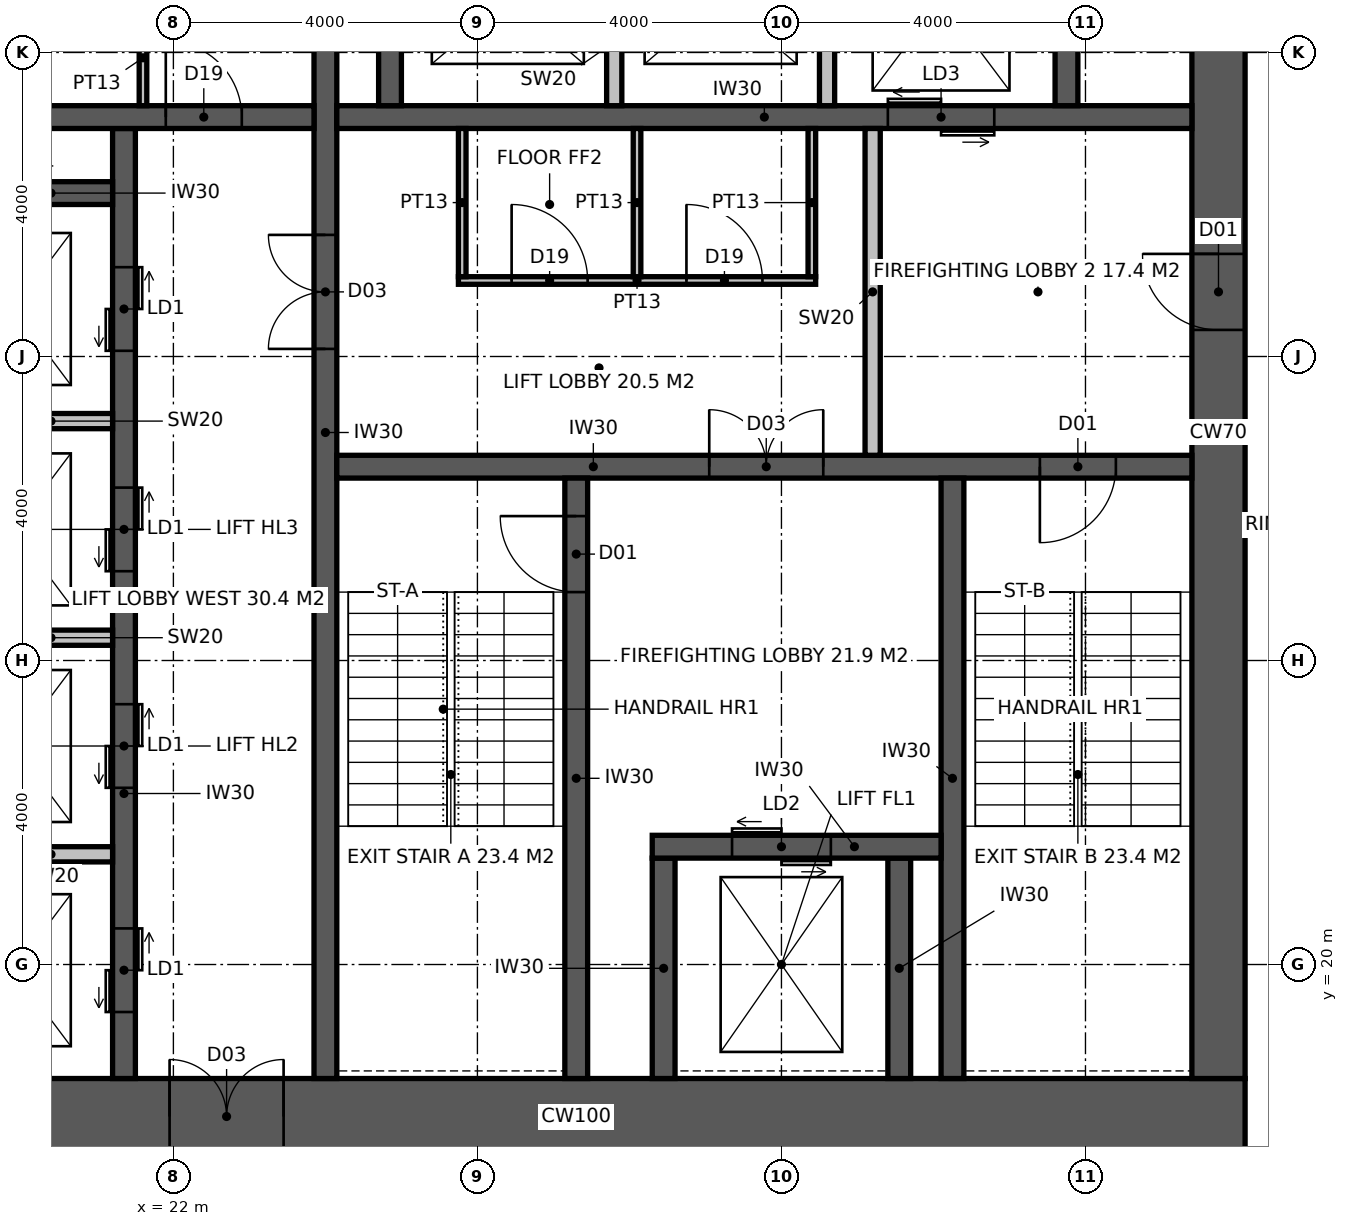
"""IFC4 building model, lengths in metres.
Left out: names, types, materials, properties, quantities, classifications, styles, units other than length and angle.
Written with IfcOpenShell. Run it as: python <this file> out.ifc"""

import sys

from ifc_helpers import new_model, si_unit, direction, frame, frame_2d, origin, place, context, subcontext, project, spatial, rectangle, extrude, element, fill, save


model = new_model("IFC4")
c1 = context("Model", 3, precision=1e-05, world=origin(), true_north=direction((0.0, 1.0)))
c2 = subcontext(c1, "Body", "Model", "MODEL_VIEW")
j1 = project(units=[si_unit("LENGTHUNIT", "METRE"), si_unit("PLANEANGLEUNIT", "RADIAN")], contexts=[c1])
p1 = place(None, origin())
s1 = spatial("IfcSite", under=j1, at=p1, CompositionType="ELEMENT")
p2 = place(p1, origin())
s2 = spatial("IfcBuilding", under=s1, at=p2, CompositionType="ELEMENT")
p3 = place(p2, frame((0.0, 0.0, 175.8)))
s3 = spatial("IfcBuildingStorey", under=s2, at=p3, CompositionType="ELEMENT", Elevation=175.8)
p4 = place(p3, frame((18.5, 18.0, -0.15), z_axis=(0.0, 0.0, 1.0), x_axis=(1.0, 0.0, 0.0)))
e1 = element("IfcWall", 1, at=p4, inside=s3, PredefinedType="SHEAR", context=c2, shape_type="SweptSolid", body=[
    extrude(rectangle(XDim=17.6, YDim=1.0, at=frame_2d((8.8, 0.0))), origin(), (0.0, 0.0, 1.0), 4.0),
])
p5 = place(p4, frame((3.45, 0.0, 0.15)))
e2 = element("IfcOpeningElement", 2, at=p5, cuts=e1, PredefinedType="OPENING", context=c2, shape_type="SweptSolid", body=[
    extrude(rectangle(XDim=1.5, YDim=2.4, at=frame_2d((0.75, 1.2))), frame((0.0, 0.51, 0.0), z_axis=(0.0, -1.0, 0.0), x_axis=(1.0, 0.0, 0.0)), (0.0, 0.0, 1.0), 1.02),
])
p6 = place(p3, frame((35.75, 18.5, -0.15), z_axis=(0.0, 0.0, 1.0), x_axis=(0.0, 1.0, 0.0)))
e3 = element("IfcWall", 3, at=p6, inside=s3, PredefinedType="SHEAR", context=c2, shape_type="SweptSolid", body=[
    extrude(rectangle(XDim=17.0, YDim=0.7, at=frame_2d((8.5, 0.0))), origin(), (0.0, 0.0, 1.0), 4.0),
])
p7 = place(p6, frame((9.85, 0.0, 0.15)))
e4 = element("IfcOpeningElement", 4, at=p7, cuts=e3, PredefinedType="OPENING", context=c2, shape_type="SweptSolid", body=[
    extrude(rectangle(XDim=1.0, YDim=2.2, at=frame_2d((0.5, 1.1))), frame((0.0, 0.36, 0.0), z_axis=(0.0, -1.0, 0.0), x_axis=(1.0, 0.0, 0.0)), (0.0, 0.0, 1.0), 0.72),
])
p8 = place(p3, frame((24.0, 18.5, -0.15), z_axis=(0.0, 0.0, 1.0), x_axis=(0.0, 1.0, 0.0)))
e5 = element("IfcWall", 5, at=p8, inside=s3, PredefinedType="SHEAR", context=c2, shape_type="SweptSolid", body=[
    extrude(rectangle(XDim=17.0, YDim=0.3, at=frame_2d((8.5, 0.0))), origin(), (0.0, 0.0, 1.0), 4.0),
])
p9 = place(p8, frame((9.6, 0.0, 0.15)))
e6 = element("IfcOpeningElement", 6, at=p9, cuts=e5, PredefinedType="OPENING", context=c2, shape_type="SweptSolid", body=[
    extrude(rectangle(XDim=1.5, YDim=2.4, at=frame_2d((0.75, 1.2))), frame((0.0, 0.16, 0.0), z_axis=(0.0, -1.0, 0.0), x_axis=(1.0, 0.0, 0.0)), (0.0, 0.0, 1.0), 0.32),
])
p10 = place(p3, frame((24.15, 26.55, -0.15), z_axis=(0.0, 0.0, 1.0), x_axis=(1.0, 0.0, 0.0)))
e7 = element("IfcWall", 7, at=p10, inside=s3, PredefinedType="SHEAR", context=c2, shape_type="SweptSolid", body=[
    extrude(rectangle(XDim=11.25, YDim=0.3, at=frame_2d((5.625, 0.0))), origin(), (0.0, 0.0, 1.0), 4.0),
])
p11 = place(p10, frame((9.25, 0.0, 0.15)))
e8 = element("IfcOpeningElement", 8, at=p11, cuts=e7, PredefinedType="OPENING", context=c2, shape_type="SweptSolid", body=[
    extrude(rectangle(XDim=1.0, YDim=2.2, at=frame_2d((0.5, 1.1))), frame((0.0, 0.16, 0.0), z_axis=(0.0, -1.0, 0.0), x_axis=(1.0, 0.0, 0.0)), (0.0, 0.0, 1.0), 0.32),
])
p12 = place(p10, frame((4.9, 0.0, 0.15)))
e9 = element("IfcOpeningElement", 9, at=p12, cuts=e7, PredefinedType="OPENING", context=c2, shape_type="SweptSolid", body=[
    extrude(rectangle(XDim=1.5, YDim=2.4, at=frame_2d((0.75, 1.2))), frame((0.0, 0.16, 0.0), z_axis=(0.0, -1.0, 0.0), x_axis=(1.0, 0.0, 0.0)), (0.0, 0.0, 1.0), 0.32),
])
p13 = place(p3, frame((27.3, 18.5, -0.15), z_axis=(0.0, 0.0, 1.0), x_axis=(0.0, 1.0, 0.0)))
e10 = element("IfcWall", 10, at=p13, inside=s3, PredefinedType="SHEAR", context=c2, shape_type="SweptSolid", body=[
    extrude(rectangle(XDim=7.9, YDim=0.3, at=frame_2d((3.95, 0.0))), origin(), (0.0, 0.0, 1.0), 4.0),
])
p14 = place(p13, frame((6.4, 0.0, 0.15)))
e11 = element("IfcOpeningElement", 11, at=p14, cuts=e10, PredefinedType="OPENING", context=c2, shape_type="SweptSolid", body=[
    extrude(rectangle(XDim=1.0, YDim=2.2, at=frame_2d((0.5, 1.1))), frame((0.0, 0.16, 0.0), z_axis=(0.0, -1.0, 0.0), x_axis=(1.0, 0.0, 0.0)), (0.0, 0.0, 1.0), 0.32),
])
p15 = place(p3, frame((32.25, 18.5, -0.15), z_axis=(0.0, 0.0, 1.0), x_axis=(0.0, 1.0, 0.0)))
e12 = element("IfcWall", 12, at=p15, inside=s3, PredefinedType="SHEAR", context=c2, shape_type="SweptSolid", body=[
    extrude(rectangle(XDim=7.9, YDim=0.3, at=frame_2d((3.95, 0.0))), origin(), (0.0, 0.0, 1.0), 4.0),
])
for number, where, z_axis, x_axis in (
    (13, (28.45, 18.5, -0.15), (0.0, 0.0, 1.0), (0.0, 1.0, 0.0)),
    (14, (31.55, 18.5, -0.15), (0.0, 0.0, 1.0), (0.0, 1.0, 0.0)),
):
    element("IfcWall", number, at=place(p3, frame(where, z_axis=z_axis, x_axis=x_axis)), inside=s3, PredefinedType="SHEAR", context=c2, shape_type="SweptSolid", body=[
        extrude(rectangle(XDim=2.9, YDim=0.3, at=frame_2d((1.45, 0.0))), origin(), (0.0, 0.0, 1.0), 4.0),
    ])
p16 = place(p3, frame((28.3, 21.55, -0.15), z_axis=(0.0, 0.0, 1.0), x_axis=(1.0, 0.0, 0.0)))
e15 = element("IfcWall", 15, at=p16, inside=s3, PredefinedType="SHEAR", context=c2, shape_type="SweptSolid", body=[
    extrude(rectangle(XDim=3.8, YDim=0.3, at=frame_2d((1.9, 0.0))), origin(), (0.0, 0.0, 1.0), 4.0),
])
p17 = place(p16, frame((1.05, 0.0, 0.15)))
e16 = element("IfcOpeningElement", 16, at=p17, cuts=e15, PredefinedType="OPENING", context=c2, shape_type="SweptSolid", body=[
    extrude(rectangle(XDim=1.3, YDim=2.4, at=frame_2d((0.65, 1.2))), frame((0.0, 0.16, 0.0), z_axis=(0.0, -1.0, 0.0), x_axis=(1.0, 0.0, 0.0)), (0.0, 0.0, 1.0), 0.32),
])
p18 = place(p3, frame((24.15, 31.15, -0.15), z_axis=(0.0, 0.0, 1.0), x_axis=(1.0, 0.0, 0.0)))
e17 = element("IfcWall", 17, at=p18, inside=s3, PredefinedType="SHEAR", context=c2, shape_type="SweptSolid", body=[
    extrude(rectangle(XDim=11.25, YDim=0.3, at=frame_2d((5.625, 0.0))), origin(), (0.0, 0.0, 1.0), 4.0),
])
p19 = place(p18, frame((7.25, 0.0, 0.15)))
e18 = element("IfcOpeningElement", 18, at=p19, cuts=e17, PredefinedType="OPENING", context=c2, shape_type="SweptSolid", body=[
    extrude(rectangle(XDim=1.4, YDim=2.4, at=frame_2d((0.7, 1.2))), frame((0.0, 0.16, 0.0), z_axis=(0.0, -1.0, 0.0), x_axis=(1.0, 0.0, 0.0)), (0.0, 0.0, 1.0), 0.32),
])
p20 = place(p3, frame((21.35, 18.5, -0.15), z_axis=(0.0, 0.0, 1.0), x_axis=(0.0, 1.0, 0.0)))
e19 = element("IfcWall", 19, at=p20, inside=s3, PredefinedType="SHEAR", context=c2, shape_type="SweptSolid", body=[
    extrude(rectangle(XDim=12.5, YDim=0.3, at=frame_2d((6.25, 0.0))), origin(), (0.0, 0.0, 1.0), 4.0),
])
p21 = place(p20, frame((0.875, 0.0, 0.15)))
e20 = element("IfcOpeningElement", 20, at=p21, cuts=e19, PredefinedType="OPENING", context=c2, shape_type="SweptSolid", body=[
    extrude(rectangle(XDim=1.1, YDim=2.2, at=frame_2d((0.55, 1.1))), frame((0.0, 0.16, 0.0), z_axis=(0.0, -1.0, 0.0), x_axis=(1.0, 0.0, 0.0)), (0.0, 0.0, 1.0), 0.32),
])
p22 = place(p20, frame((3.825, 0.0, 0.15)))
e21 = element("IfcOpeningElement", 21, at=p22, cuts=e19, PredefinedType="OPENING", context=c2, shape_type="SweptSolid", body=[
    extrude(rectangle(XDim=1.1, YDim=2.2, at=frame_2d((0.55, 1.1))), frame((0.0, 0.16, 0.0), z_axis=(0.0, -1.0, 0.0), x_axis=(1.0, 0.0, 0.0)), (0.0, 0.0, 1.0), 0.32),
])
p23 = place(p20, frame((6.675, 0.0, 0.15)))
e22 = element("IfcOpeningElement", 22, at=p23, cuts=e19, PredefinedType="OPENING", context=c2, shape_type="SweptSolid", body=[
    extrude(rectangle(XDim=1.1, YDim=2.2, at=frame_2d((0.55, 1.1))), frame((0.0, 0.16, 0.0), z_axis=(0.0, -1.0, 0.0), x_axis=(1.0, 0.0, 0.0)), (0.0, 0.0, 1.0), 0.32),
])
p24 = place(p20, frame((9.575, 0.0, 0.15)))
e23 = element("IfcOpeningElement", 23, at=p24, cuts=e19, PredefinedType="OPENING", context=c2, shape_type="SweptSolid", body=[
    extrude(rectangle(XDim=1.1, YDim=2.2, at=frame_2d((0.55, 1.1))), frame((0.0, 0.16, 0.0), z_axis=(0.0, -1.0, 0.0), x_axis=(1.0, 0.0, 0.0)), (0.0, 0.0, 1.0), 0.32),
])
p25 = place(p3, frame((18.5, 31.15, -0.15), z_axis=(0.0, 0.0, 1.0), x_axis=(1.0, 0.0, 0.0)))
e24 = element("IfcWall", 24, at=p25, inside=s3, PredefinedType="SHEAR", context=c2, shape_type="SweptSolid", body=[
    extrude(rectangle(XDim=5.35, YDim=0.3, at=frame_2d((2.675, 0.0))), origin(), (0.0, 0.0, 1.0), 4.0),
])
p26 = place(p25, frame((3.4, 0.0, 0.15)))
e25 = element("IfcOpeningElement", 25, at=p26, cuts=e24, PredefinedType="OPENING", context=c2, shape_type="SweptSolid", body=[
    extrude(rectangle(XDim=1.0, YDim=2.2, at=frame_2d((0.5, 1.1))), frame((0.0, 0.16, 0.0), z_axis=(0.0, -1.0, 0.0), x_axis=(1.0, 0.0, 0.0)), (0.0, 0.0, 1.0), 0.32),
])
p27 = place(p3, frame((18.5, 30.15, -0.15), z_axis=(0.0, 0.0, 1.0), x_axis=(1.0, 0.0, 0.0)))
e26 = element("IfcWall", 26, at=p27, inside=s3, PredefinedType="SHEAR", context=c2, shape_type="SweptSolid", body=[
    extrude(rectangle(XDim=2.7, YDim=0.3, at=frame_2d((1.35, 0.0))), origin(), (0.0, 0.0, 1.0), 4.0),
])
for number, where, z_axis, x_axis in (
    (27, (24.85, 31.3, -0.15), (0.0, 0.0, 1.0), (0.0, 1.0, 0.0)),
    (28, (33.75, 31.3, -0.15), (0.0, 0.0, 1.0), (0.0, 1.0, 0.0)),
):
    element("IfcWall", number, at=place(p3, frame(where, z_axis=z_axis, x_axis=x_axis)), inside=s3, PredefinedType="SHEAR", context=c2, shape_type="SweptSolid", body=[
        extrude(rectangle(XDim=4.2, YDim=0.3, at=frame_2d((2.1, 0.0))), origin(), (0.0, 0.0, 1.0), 4.0),
    ])
for number, where, z_axis, x_axis in (
    (29, (27.8, 31.3, -0.15), (0.0, 0.0, 1.0), (0.0, 1.0, 0.0)),
    (30, (30.6, 31.3, -0.15), (0.0, 0.0, 1.0), (0.0, 1.0, 0.0)),
):
    element("IfcWall", number, at=place(p3, frame(where, z_axis=z_axis, x_axis=x_axis)), inside=s3, PredefinedType="SOLIDWALL", context=c2, shape_type="SweptSolid", body=[
        extrude(rectangle(XDim=2.8, YDim=0.2, at=frame_2d((1.4, 0.0))), origin(), (0.0, 0.0, 1.0), 4.0),
    ])
for number, where, z_axis, x_axis in (
    (31, (18.5, 21.45, -0.15), (0.0, 0.0, 1.0), (1.0, 0.0, 0.0)),
    (32, (18.5, 24.3, -0.15), (0.0, 0.0, 1.0), (1.0, 0.0, 0.0)),
    (33, (18.5, 27.15, -0.15), (0.0, 0.0, 1.0), (1.0, 0.0, 0.0)),
):
    element("IfcWall", number, at=place(p3, frame(where, z_axis=z_axis, x_axis=x_axis)), inside=s3, PredefinedType="SOLIDWALL", context=c2, shape_type="SweptSolid", body=[
        extrude(rectangle(XDim=2.7, YDim=0.2, at=frame_2d((1.35, 0.0))), origin(), (0.0, 0.0, 1.0), 4.0),
    ])
p28 = place(p3, frame((31.2, 26.7, 0.0), z_axis=(0.0, 0.0, 1.0), x_axis=(0.0, 1.0, 0.0)))
e34 = element("IfcWall", 34, at=p28, inside=s3, PredefinedType="SOLIDWALL", context=c2, shape_type="SweptSolid", body=[
    extrude(rectangle(XDim=4.3, YDim=0.2, at=frame_2d((2.15, 0.0))), origin(), (0.0, 0.0, 1.0), 3.85),
])
p29 = place(p3, frame((21.6, 31.3, 0.0), z_axis=(0.0, 0.0, 1.0), x_axis=(0.0, 1.0, 0.0)))
e35 = element("IfcWall", 35, at=p29, inside=s3, PredefinedType="PARTITIONING", context=c2, shape_type="SweptSolid", body=[
    extrude(rectangle(XDim=4.2, YDim=0.1, at=frame_2d((2.1, 0.0))), origin(), (0.0, 0.0, 1.0), 3.85),
])
p30 = place(p29, frame((1.55, 0.0, 0.0)))
e36 = element("IfcOpeningElement", 36, at=p30, cuts=e35, PredefinedType="OPENING", context=c2, shape_type="SweptSolid", body=[
    extrude(rectangle(XDim=1.0, YDim=2.2, at=frame_2d((0.5, 1.1))), frame((0.0, 0.06, 0.0), z_axis=(0.0, -1.0, 0.0), x_axis=(1.0, 0.0, 0.0)), (0.0, 0.0, 1.0), 0.12),
])
p31 = place(p3, frame((25.75, 29.0, 0.0), z_axis=(0.0, 0.0, 1.0), x_axis=(1.0, 0.0, 0.0)))
e37 = element("IfcWall", 37, at=p31, inside=s3, PredefinedType="PARTITIONING", context=c2, shape_type="SweptSolid", body=[
    extrude(rectangle(XDim=4.7, YDim=0.1, at=frame_2d((2.35, 0.0))), origin(), (0.0, 0.0, 1.0), 3.85),
])
p32 = place(p31, frame((0.7, 0.0, 0.0)))
e38 = element("IfcOpeningElement", 38, at=p32, cuts=e37, PredefinedType="OPENING", context=c2, shape_type="SweptSolid", body=[
    extrude(rectangle(XDim=1.0, YDim=2.2, at=frame_2d((0.5, 1.1))), frame((0.0, 0.06, 0.0), z_axis=(0.0, -1.0, 0.0), x_axis=(1.0, 0.0, 0.0)), (0.0, 0.0, 1.0), 0.12),
])
p33 = place(p31, frame((3.0, 0.0, 0.0)))
e39 = element("IfcOpeningElement", 39, at=p33, cuts=e37, PredefinedType="OPENING", context=c2, shape_type="SweptSolid", body=[
    extrude(rectangle(XDim=1.0, YDim=2.2, at=frame_2d((0.5, 1.1))), frame((0.0, 0.06, 0.0), z_axis=(0.0, -1.0, 0.0), x_axis=(1.0, 0.0, 0.0)), (0.0, 0.0, 1.0), 0.12),
])
for number, where, z_axis, x_axis in (
    (40, (25.8, 29.05, 0.0), (0.0, 0.0, 1.0), (0.0, 1.0, 0.0)),
    (41, (30.4, 29.05, 0.0), (0.0, 0.0, 1.0), (0.0, 1.0, 0.0)),
    (42, (28.1, 29.05, 0.0), (0.0, 0.0, 1.0), (0.0, 1.0, 0.0)),
):
    element("IfcWall", number, at=place(p3, frame(where, z_axis=z_axis, x_axis=x_axis)), inside=s3, PredefinedType="PARTITIONING", context=c2, shape_type="SweptSolid", body=[
        extrude(rectangle(XDim=1.95, YDim=0.1, at=frame_2d((0.975, 0.0))), origin(), (0.0, 0.0, 1.0), 3.85),
    ])
p34 = place(p14, origin())
e43 = element("IfcDoor", 43, at=p34, inside=s3, OperationType="SINGLE_SWING_RIGHT", PredefinedType="DOOR", context=c2, shape_type="SweptSolid", body=[
    extrude(rectangle(XDim=1.0, YDim=2.2, at=frame_2d((0.5, 1.1))), frame((0.0, 0.025, 0.0), z_axis=(0.0, -1.0, 0.0), x_axis=(1.0, 0.0, 0.0)), (0.0, 0.0, 1.0), 0.05),
])
fill(e11, e43)
p35 = place(p11, frame((1.0, 0.0, 0.0), z_axis=(0.0, 0.0, 1.0), x_axis=(-1.0, 0.0, 0.0)))
e44 = element("IfcDoor", 44, at=p35, inside=s3, OperationType="SINGLE_SWING_RIGHT", PredefinedType="DOOR", context=c2, shape_type="SweptSolid", body=[
    extrude(rectangle(XDim=1.0, YDim=2.2, at=frame_2d((0.5, 1.1))), frame((0.0, 0.025, 0.0), z_axis=(0.0, -1.0, 0.0), x_axis=(1.0, 0.0, 0.0)), (0.0, 0.0, 1.0), 0.05),
])
fill(e8, e44)
p36 = place(p7, origin())
e45 = element("IfcDoor", 45, at=p36, inside=s3, OperationType="SINGLE_SWING_RIGHT", PredefinedType="DOOR", context=c2, shape_type="SweptSolid", body=[
    extrude(rectangle(XDim=1.0, YDim=2.2, at=frame_2d((0.5, 1.1))), frame((0.0, 0.025, 0.0), z_axis=(0.0, -1.0, 0.0), x_axis=(1.0, 0.0, 0.0)), (0.0, 0.0, 1.0), 0.05),
])
fill(e4, e45)
p37 = place(p12, origin())
e46 = element("IfcDoor", 46, at=p37, inside=s3, OperationType="DOUBLE_DOOR_DOUBLE_SWING", PredefinedType="DOOR", context=c2, shape_type="SweptSolid", body=[
    extrude(rectangle(XDim=1.5, YDim=2.4, at=frame_2d((0.75, 1.2))), frame((0.0, 0.025, 0.0), z_axis=(0.0, -1.0, 0.0), x_axis=(1.0, 0.0, 0.0)), (0.0, 0.0, 1.0), 0.05),
])
fill(e9, e46)
p38 = place(p9, origin())
e47 = element("IfcDoor", 47, at=p38, inside=s3, OperationType="DOUBLE_DOOR_DOUBLE_SWING", PredefinedType="DOOR", context=c2, shape_type="SweptSolid", body=[
    extrude(rectangle(XDim=1.5, YDim=2.4, at=frame_2d((0.75, 1.2))), frame((0.0, 0.025, 0.0), z_axis=(0.0, -1.0, 0.0), x_axis=(1.0, 0.0, 0.0)), (0.0, 0.0, 1.0), 0.05),
])
fill(e6, e47)
p39 = place(p26, origin())
e48 = element("IfcDoor", 48, at=p39, inside=s3, OperationType="SINGLE_SWING_LEFT", PredefinedType="DOOR", context=c2, shape_type="SweptSolid", body=[
    extrude(rectangle(XDim=1.0, YDim=2.2, at=frame_2d((0.5, 1.1))), frame((0.0, 0.025, 0.0), z_axis=(0.0, -1.0, 0.0), x_axis=(1.0, 0.0, 0.0)), (0.0, 0.0, 1.0), 0.05),
])
fill(e25, e48)
p40 = place(p32, origin())
e49 = element("IfcDoor", 49, at=p40, inside=s3, OperationType="SINGLE_SWING_LEFT", PredefinedType="DOOR", context=c2, shape_type="SweptSolid", body=[
    extrude(rectangle(XDim=1.0, YDim=2.2, at=frame_2d((0.5, 1.1))), frame((0.0, 0.025, 0.0), z_axis=(0.0, -1.0, 0.0), x_axis=(1.0, 0.0, 0.0)), (0.0, 0.0, 1.0), 0.05),
])
fill(e38, e49)
p41 = place(p33, origin())
e50 = element("IfcDoor", 50, at=p41, inside=s3, OperationType="SINGLE_SWING_LEFT", PredefinedType="DOOR", context=c2, shape_type="SweptSolid", body=[
    extrude(rectangle(XDim=1.0, YDim=2.2, at=frame_2d((0.5, 1.1))), frame((0.0, 0.025, 0.0), z_axis=(0.0, -1.0, 0.0), x_axis=(1.0, 0.0, 0.0)), (0.0, 0.0, 1.0), 0.05),
])
fill(e39, e50)
p42 = place(p5, origin())
e51 = element("IfcDoor", 51, at=p42, inside=s3, OperationType="DOUBLE_DOOR_DOUBLE_SWING", PredefinedType="DOOR", context=c2, shape_type="SweptSolid", body=[
    extrude(rectangle(XDim=1.5, YDim=2.4, at=frame_2d((0.75, 1.2))), frame((0.0, 0.025, 0.0), z_axis=(0.0, -1.0, 0.0), x_axis=(1.0, 0.0, 0.0)), (0.0, 0.0, 1.0), 0.05),
])
fill(e2, e51)
p43 = place(p17, origin())
e52 = element("IfcDoor", 52, at=p43, inside=s3, OperationType="DOUBLE_DOOR_SLIDING", PredefinedType="DOOR", context=c2, shape_type="SweptSolid", body=[
    extrude(rectangle(XDim=1.3, YDim=2.4, at=frame_2d((0.65, 1.2))), frame((0.0, 0.025, 0.0), z_axis=(0.0, -1.0, 0.0), x_axis=(1.0, 0.0, 0.0)), (0.0, 0.0, 1.0), 0.05),
])
fill(e16, e52)
p44 = place(p19, origin())
e53 = element("IfcDoor", 53, at=p44, inside=s3, OperationType="DOUBLE_DOOR_SLIDING", PredefinedType="DOOR", context=c2, shape_type="SweptSolid", body=[
    extrude(rectangle(XDim=1.4, YDim=2.4, at=frame_2d((0.7, 1.2))), frame((0.0, 0.025, 0.0), z_axis=(0.0, -1.0, 0.0), x_axis=(1.0, 0.0, 0.0)), (0.0, 0.0, 1.0), 0.05),
])
fill(e18, e53)
p45 = place(p21, origin())
e54 = element("IfcDoor", 54, at=p45, inside=s3, OperationType="DOUBLE_DOOR_SLIDING", PredefinedType="DOOR", context=c2, shape_type="SweptSolid", body=[
    extrude(rectangle(XDim=1.1, YDim=2.2, at=frame_2d((0.55, 1.1))), frame((0.0, 0.025, 0.0), z_axis=(0.0, -1.0, 0.0), x_axis=(1.0, 0.0, 0.0)), (0.0, 0.0, 1.0), 0.05),
])
fill(e20, e54)
p46 = place(p22, origin())
e55 = element("IfcDoor", 55, at=p46, inside=s3, OperationType="DOUBLE_DOOR_SLIDING", PredefinedType="DOOR", context=c2, shape_type="SweptSolid", body=[
    extrude(rectangle(XDim=1.1, YDim=2.2, at=frame_2d((0.55, 1.1))), frame((0.0, 0.025, 0.0), z_axis=(0.0, -1.0, 0.0), x_axis=(1.0, 0.0, 0.0)), (0.0, 0.0, 1.0), 0.05),
])
fill(e21, e55)
p47 = place(p23, origin())
e56 = element("IfcDoor", 56, at=p47, inside=s3, OperationType="DOUBLE_DOOR_SLIDING", PredefinedType="DOOR", context=c2, shape_type="SweptSolid", body=[
    extrude(rectangle(XDim=1.1, YDim=2.2, at=frame_2d((0.55, 1.1))), frame((0.0, 0.025, 0.0), z_axis=(0.0, -1.0, 0.0), x_axis=(1.0, 0.0, 0.0)), (0.0, 0.0, 1.0), 0.05),
])
fill(e22, e56)
p48 = place(p24, origin())
e57 = element("IfcDoor", 57, at=p48, inside=s3, OperationType="DOUBLE_DOOR_SLIDING", PredefinedType="DOOR", context=c2, shape_type="SweptSolid", body=[
    extrude(rectangle(XDim=1.1, YDim=2.2, at=frame_2d((0.55, 1.1))), frame((0.0, 0.025, 0.0), z_axis=(0.0, -1.0, 0.0), x_axis=(1.0, 0.0, 0.0)), (0.0, 0.0, 1.0), 0.05),
])
fill(e23, e57)
save(model, sys.argv[1])
